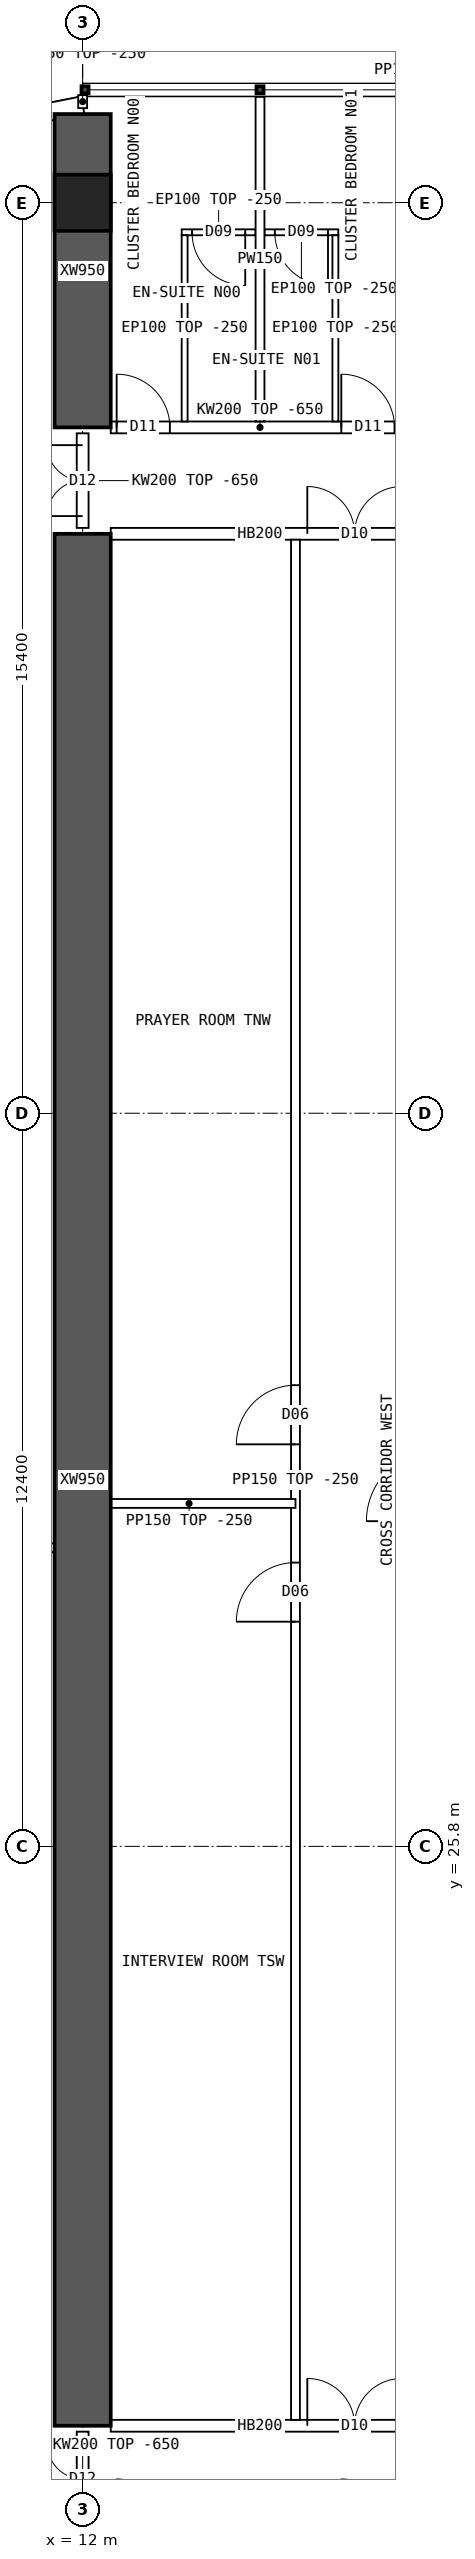
"""IFC4 building model, lengths in metres.
Left out: names, types, materials, properties, quantities, classifications, styles, units other than length and angle.
Written with IfcOpenShell. Run it as: python <this file> out.ifc"""

import sys

from ifc_helpers import new_model, si_unit, direction, frame, frame_2d, origin, origin_2d, place, context, subcontext, project, spatial, polyline, rectangle, hollow_rectangle, outline, extrude, element, fill, save


model = new_model("IFC4")
c1 = context("Model", 3, precision=1e-05, world=origin(), true_north=direction((0.0, 1.0)))
c2 = subcontext(c1, "Body", "Model", "MODEL_VIEW")
j1 = project(units=[si_unit("LENGTHUNIT", "METRE"), si_unit("PLANEANGLEUNIT", "RADIAN")], contexts=[c1])
p1 = place(None, origin())
s1 = spatial("IfcSite", under=j1, at=p1, CompositionType="ELEMENT")
p2 = place(p1, origin())
s2 = spatial("IfcBuilding", under=s1, at=p2, CompositionType="ELEMENT")
p3 = place(p2, frame((0.0, 0.0, 118.15)))
s3 = spatial("IfcBuildingStorey", under=s2, at=p3, CompositionType="ELEMENT", Elevation=118.15)
p4 = place(p3, frame((12.0, 53.6, 0.0), z_axis=(0.0, 0.0, 1.0), x_axis=(1.0, 0.0, 0.0)))
e1 = element("IfcColumn", 1, at=p4, inside=s3, PredefinedType="COLUMN", context=c2, shape_type="SweptSolid", body=[
    extrude(hollow_rectangle(XDim=0.95, YDim=0.95, WallThickness=0.095, at=origin_2d()), origin(), (0.0, 0.0, 1.0), 3.75),
])
p5 = place(p3, frame((12.0, 49.8, 0.0), z_axis=(0.0, 0.0, 1.0), x_axis=(0.0, 1.0, 0.0)))
e2 = element("IfcWall", 2, at=p5, inside=s3, PredefinedType="SHEAR", context=c2, shape_type="SweptSolid", body=[
    extrude(rectangle(XDim=5.3, YDim=0.95, at=frame_2d((2.65, 0.0))), origin(), (0.0, 0.0, 1.0), 3.75),
])
p6 = place(p3, frame((12.0, 16.0, 0.0), z_axis=(0.0, 0.0, 1.0), x_axis=(0.0, 1.0, 0.0)))
e3 = element("IfcWall", 3, at=p6, inside=s3, PredefinedType="SHEAR", context=c2, shape_type="SweptSolid", body=[
    extrude(rectangle(XDim=32.0, YDim=0.95, at=frame_2d((16.0, 0.0))), origin(), (0.0, 0.0, 1.0), 3.75),
])
p7 = place(p3, frame((12.0, 55.25, 0.0), z_axis=(0.0, 0.0, 1.0), x_axis=(-0.980787251524, -0.195080412259, 0.0)))
e4 = element("IfcWall", 4, at=p7, inside=s3, PredefinedType="SOLIDWALL", context=c2, shape_type="SweptSolid", body=[
    extrude(outline(polyline([(-0.03, -0.15), (3.249, -0.15), (3.189, 0.15), (0.03, 0.15), (-0.03, -0.15)])), origin(), (0.0, 0.0, 1.0), 3.5),
])
p8 = place(p7, frame((0.909, 0.0, 0.9)))
e5 = element("IfcOpeningElement", 5, at=p8, cuts=e4, PredefinedType="OPENING", context=c2, shape_type="SweptSolid", body=[
    extrude(rectangle(XDim=1.4, YDim=1.8, at=frame_2d((0.7, 0.9))), frame((0.0, 0.16, 0.0), z_axis=(0.0, -1.0, 0.0), x_axis=(1.0, 0.0, 0.0)), (0.0, 0.0, 1.0), 0.32),
])
p9 = place(p3, frame((12.475, 16.0, 0.0), z_axis=(0.0, 0.0, 1.0), x_axis=(1.0, 0.0, 0.0)))
e6 = element("IfcWall", 6, at=p9, inside=s3, PredefinedType="SOLIDWALL", context=c2, shape_type="SweptSolid", body=[
    extrude(rectangle(XDim=5.05, YDim=0.2, at=frame_2d((2.525, 0.0))), origin(), (0.0, 0.0, 1.0), 3.5),
])
p10 = place(p9, frame((3.325, 0.0, 0.0)))
e7 = element("IfcOpeningElement", 7, at=p10, cuts=e6, PredefinedType="OPENING", context=c2, shape_type="SweptSolid", body=[
    extrude(rectangle(XDim=1.6, YDim=2.1, at=frame_2d((0.8, 1.05))), frame((0.0, 0.11, 0.0), z_axis=(0.0, -1.0, 0.0), x_axis=(1.0, 0.0, 0.0)), (0.0, 0.0, 1.0), 0.22),
])
p11 = place(p3, frame((12.475, 49.8, 0.0), z_axis=(0.0, 0.0, 1.0), x_axis=(1.0, 0.0, 0.0)))
e8 = element("IfcWall", 8, at=p11, inside=s3, PredefinedType="SOLIDWALL", context=c2, shape_type="SweptSolid", body=[
    extrude(outline(polyline([(0.0, 0.0), (5.05, 0.0), (5.05, 3.1), (0.0, 3.1), (0.0, 0.0)])), frame((0.0, 0.1, 0.0), z_axis=(0.0, -1.0, 0.0), x_axis=(1.0, 0.0, 0.0)), (0.0, 0.0, 1.0), 0.2),
])
p12 = place(p11, frame((0.1, 0.0, 0.0)))
e9 = element("IfcOpeningElement", 9, at=p12, cuts=e8, PredefinedType="OPENING", context=c2, shape_type="SweptSolid", body=[
    extrude(rectangle(XDim=0.9, YDim=2.1, at=frame_2d((0.45, 1.05))), frame((0.0, 0.11, 0.0), z_axis=(0.0, -1.0, 0.0), x_axis=(1.0, 0.0, 0.0)), (0.0, 0.0, 1.0), 0.22),
])
p13 = place(p11, frame((3.9, 0.0, 0.0)))
e10 = element("IfcOpeningElement", 10, at=p13, cuts=e8, PredefinedType="OPENING", context=c2, shape_type="SweptSolid", body=[
    extrude(rectangle(XDim=0.9, YDim=2.1, at=frame_2d((0.45, 1.05))), frame((0.0, 0.11, 0.0), z_axis=(0.0, -1.0, 0.0), x_axis=(1.0, 0.0, 0.0)), (0.0, 0.0, 1.0), 0.22),
])
p14 = place(p3, frame((12.475, 48.0, 0.0), z_axis=(0.0, 0.0, 1.0), x_axis=(1.0, 0.0, 0.0)))
e11 = element("IfcWall", 11, at=p14, inside=s3, PredefinedType="SOLIDWALL", context=c2, shape_type="SweptSolid", body=[
    extrude(rectangle(XDim=5.05, YDim=0.2, at=frame_2d((2.525, 0.0))), origin(), (0.0, 0.0, 1.0), 3.5),
])
p15 = place(p14, frame((3.325, 0.0, 0.0)))
e12 = element("IfcOpeningElement", 12, at=p15, cuts=e11, PredefinedType="OPENING", context=c2, shape_type="SweptSolid", body=[
    extrude(rectangle(XDim=1.6, YDim=2.1, at=frame_2d((0.8, 1.05))), frame((0.0, 0.11, 0.0), z_axis=(0.0, -1.0, 0.0), x_axis=(1.0, 0.0, 0.0)), (0.0, 0.0, 1.0), 0.22),
])
p16 = place(p3, frame((15.0, 55.39, 0.0), z_axis=(0.0, 0.0, 1.0), x_axis=(0.0, -1.0, 0.0)))
e13 = element("IfcWall", 13, at=p16, inside=s3, PredefinedType="PARTITIONING", context=c2, shape_type="SweptSolid", body=[
    extrude(outline(polyline([(0.0, 0.0), (5.49, 0.0), (5.49, 3.1), (5.442, 3.1), (5.44, 3.5), (1.992, 3.5), (1.99, 3.1), (1.592, 3.1), (1.59, 3.5), (0.0, 3.5), (0.0, 0.0)])), frame((0.0, 0.075, 0.0), z_axis=(0.0, -1.0, 0.0), x_axis=(1.0, 0.0, 0.0)), (0.0, 0.0, 1.0), 0.15),
])
p17 = place(p3, frame((13.675, 53.1, 0.0), z_axis=(0.0, 0.0, 1.0), x_axis=(1.0, 0.0, 0.0)))
e14 = element("IfcWall", 14, at=p17, inside=s3, PredefinedType="PARTITIONING", context=c2, shape_type="SweptSolid", body=[
    extrude(rectangle(XDim=1.25, YDim=0.1, at=frame_2d((0.625, 0.0))), origin(), (0.0, 0.0, 1.0), 3.5),
])
p18 = place(p17, frame((0.175, 0.0, 0.0)))
e15 = element("IfcOpeningElement", 15, at=p18, cuts=e14, PredefinedType="OPENING", context=c2, shape_type="SweptSolid", body=[
    extrude(rectangle(XDim=0.9, YDim=2.1, at=frame_2d((0.45, 1.05))), frame((0.0, 0.06, 0.0), z_axis=(0.0, -1.0, 0.0), x_axis=(1.0, 0.0, 0.0)), (0.0, 0.0, 1.0), 0.12),
])
p19 = place(p3, frame((13.725, 53.05, 0.0), z_axis=(0.0, 0.0, 1.0), x_axis=(0.0, -1.0, 0.0)))
e16 = element("IfcWall", 16, at=p19, inside=s3, PredefinedType="PARTITIONING", context=c2, shape_type="SweptSolid", body=[
    extrude(outline(polyline([(0.0, 0.0), (3.15, 0.0), (3.15, 3.1), (3.102, 3.1), (3.1, 3.5), (0.0, 3.5), (0.0, 0.0)])), frame((0.0, 0.05, 0.0), z_axis=(0.0, -1.0, 0.0), x_axis=(1.0, 0.0, 0.0)), (0.0, 0.0, 1.0), 0.1),
])
p20 = place(p3, frame((15.075, 53.1, 0.0), z_axis=(0.0, 0.0, 1.0), x_axis=(1.0, 0.0, 0.0)))
e17 = element("IfcWall", 17, at=p20, inside=s3, PredefinedType="PARTITIONING", context=c2, shape_type="SweptSolid", body=[
    extrude(rectangle(XDim=1.25, YDim=0.1, at=frame_2d((0.625, 0.0))), origin(), (0.0, 0.0, 1.0), 3.5),
])
p21 = place(p20, frame((0.175, 0.0, 0.0)))
e18 = element("IfcOpeningElement", 18, at=p21, cuts=e17, PredefinedType="OPENING", context=c2, shape_type="SweptSolid", body=[
    extrude(rectangle(XDim=0.9, YDim=2.1, at=frame_2d((0.45, 1.05))), frame((0.0, 0.06, 0.0), z_axis=(0.0, -1.0, 0.0), x_axis=(1.0, 0.0, 0.0)), (0.0, 0.0, 1.0), 0.12),
])
p22 = place(p3, frame((16.275, 53.05, 0.0), z_axis=(0.0, 0.0, 1.0), x_axis=(0.0, -1.0, 0.0)))
e19 = element("IfcWall", 19, at=p22, inside=s3, PredefinedType="PARTITIONING", context=c2, shape_type="SweptSolid", body=[
    extrude(outline(polyline([(0.0, 0.0), (3.15, 0.0), (3.15, 3.1), (3.102, 3.1), (3.1, 3.5), (0.0, 3.5), (0.0, 0.0)])), frame((0.0, 0.05, 0.0), z_axis=(0.0, -1.0, 0.0), x_axis=(1.0, 0.0, 0.0)), (0.0, 0.0, 1.0), 0.1),
])
p23 = place(p3, frame((15.6, 16.1, 0.0), z_axis=(0.0, 0.0, 1.0), x_axis=(0.0, 1.0, 0.0)))
e20 = element("IfcWall", 20, at=p23, inside=s3, PredefinedType="PARTITIONING", context=c2, shape_type="SweptSolid", body=[
    extrude(rectangle(XDim=31.8, YDim=0.15, at=frame_2d((15.9, 0.0))), origin(), (0.0, 0.0, 1.0), 3.5),
])
p24 = place(p23, frame((13.5, 0.0, 0.0)))
e21 = element("IfcOpeningElement", 21, at=p24, cuts=e20, PredefinedType="OPENING", context=c2, shape_type="SweptSolid", body=[
    extrude(rectangle(XDim=1.0, YDim=2.1, at=frame_2d((0.5, 1.05))), frame((0.0, 0.085, 0.0), z_axis=(0.0, -1.0, 0.0), x_axis=(1.0, 0.0, 0.0)), (0.0, 0.0, 1.0), 0.17),
])
p25 = place(p23, frame((16.5, 0.0, 0.0)))
e22 = element("IfcOpeningElement", 22, at=p25, cuts=e20, PredefinedType="OPENING", context=c2, shape_type="SweptSolid", body=[
    extrude(rectangle(XDim=1.0, YDim=2.1, at=frame_2d((0.5, 1.05))), frame((0.0, 0.085, 0.0), z_axis=(0.0, -1.0, 0.0), x_axis=(1.0, 0.0, 0.0)), (0.0, 0.0, 1.0), 0.17),
])
p26 = place(p3, frame((12.0, 31.6, 0.0), z_axis=(0.0, 0.0, 1.0), x_axis=(1.0, 0.0, 0.0)))
e23 = element("IfcWall", 23, at=p26, inside=s3, PredefinedType="PARTITIONING", context=c2, shape_type="SweptSolid", body=[
    extrude(rectangle(XDim=3.6, YDim=0.15, at=frame_2d((1.8, 0.0))), origin(), (0.0, 0.0, 1.0), 3.5),
])
p27 = place(p3, frame((3.905, 30.85, 0.0), z_axis=(0.0, 0.0, 1.0), x_axis=(1.0, 0.0, 0.0)))
e24 = element("IfcWall", 24, at=p27, inside=s3, PredefinedType="PARTITIONING", context=c2, shape_type="SweptSolid", body=[
    extrude(outline(polyline([(0.0, 0.0), (8.02, 0.0), (8.02, 3.5), (2.397, 3.5), (2.395, 3.05), (1.797, 3.05), (1.795, 3.5), (0.0, 3.5), (0.0, 0.0)])), frame((0.0, 0.075, 0.0), z_axis=(0.0, -1.0, 0.0), x_axis=(1.0, 0.0, 0.0)), (0.0, 0.0, 1.0), 0.15),
])
p28 = place(p3, frame((12.0, 14.3, 0.0), z_axis=(0.0, 0.0, 1.0), x_axis=(0.0, 1.0, 0.0)))
e25 = element("IfcWall", 25, at=p28, inside=s3, PredefinedType="SOLIDWALL", context=c2, shape_type="SweptSolid", body=[
    extrude(outline(polyline([(0.0, 0.0), (1.6, 0.0), (1.6, 3.1), (0.0, 3.1), (0.0, 0.0)])), frame((0.0, 0.1, 0.0), z_axis=(0.0, -1.0, 0.0), x_axis=(1.0, 0.0, 0.0)), (0.0, 0.0, 1.0), 0.2),
])
p29 = place(p28, frame((0.2, 0.0, 0.0)))
e26 = element("IfcOpeningElement", 26, at=p29, cuts=e25, PredefinedType="OPENING", context=c2, shape_type="SweptSolid", body=[
    extrude(rectangle(XDim=1.2, YDim=2.1, at=frame_2d((0.6, 1.05))), frame((0.0, 0.11, 0.0), z_axis=(0.0, -1.0, 0.0), x_axis=(1.0, 0.0, 0.0)), (0.0, 0.0, 1.0), 0.22),
])
p30 = place(p3, frame((12.0, 48.1, 0.0), z_axis=(0.0, 0.0, 1.0), x_axis=(0.0, 1.0, 0.0)))
e27 = element("IfcWall", 27, at=p30, inside=s3, PredefinedType="SOLIDWALL", context=c2, shape_type="SweptSolid", body=[
    extrude(outline(polyline([(0.0, 0.0), (1.6, 0.0), (1.6, 3.1), (0.0, 3.1), (0.0, 0.0)])), frame((0.0, 0.1, 0.0), z_axis=(0.0, -1.0, 0.0), x_axis=(1.0, 0.0, 0.0)), (0.0, 0.0, 1.0), 0.2),
])
p31 = place(p30, frame((0.2, 0.0, 0.0)))
e28 = element("IfcOpeningElement", 28, at=p31, cuts=e27, PredefinedType="OPENING", context=c2, shape_type="SweptSolid", body=[
    extrude(rectangle(XDim=1.2, YDim=2.1, at=frame_2d((0.6, 1.05))), frame((0.0, 0.11, 0.0), z_axis=(0.0, -1.0, 0.0), x_axis=(1.0, 0.0, 0.0)), (0.0, 0.0, 1.0), 0.22),
])
p32 = place(p3, frame((12.0, 55.2, 0.0), z_axis=(0.0, 0.0, 1.0), x_axis=(0.0, 1.0, 0.0)))
e29 = element("IfcWall", 29, at=p32, inside=s3, PredefinedType="PARTITIONING", context=c2, shape_type="SweptSolid", body=[
    extrude(rectangle(XDim=0.22, YDim=0.15, at=frame_2d((0.11, 0.0))), origin(), (0.0, 0.0, 1.0), 3.5),
])
p33 = place(p10, origin())
e30 = element("IfcDoor", 30, at=p33, inside=s3, OperationType="DOUBLE_DOOR_SINGLE_SWING", PredefinedType="DOOR", context=c2, shape_type="SweptSolid", body=[
    extrude(rectangle(XDim=1.6, YDim=2.1, at=frame_2d((0.8, 1.05))), frame((0.0, 0.025, 0.0), z_axis=(0.0, -1.0, 0.0), x_axis=(1.0, 0.0, 0.0)), (0.0, 0.0, 1.0), 0.05),
])
fill(e7, e30)
p34 = place(p15, origin())
e31 = element("IfcDoor", 31, at=p34, inside=s3, OperationType="DOUBLE_DOOR_SINGLE_SWING", PredefinedType="DOOR", context=c2, shape_type="SweptSolid", body=[
    extrude(rectangle(XDim=1.6, YDim=2.1, at=frame_2d((0.8, 1.05))), frame((0.0, 0.025, 0.0), z_axis=(0.0, -1.0, 0.0), x_axis=(1.0, 0.0, 0.0)), (0.0, 0.0, 1.0), 0.05),
])
fill(e12, e31)
p35 = place(p18, origin())
e32 = element("IfcDoor", 32, at=p35, inside=s3, OperationType="SINGLE_SWING_RIGHT", PredefinedType="DOOR", context=c2, shape_type="SweptSolid", body=[
    extrude(rectangle(XDim=0.9, YDim=2.1, at=frame_2d((0.45, 1.05))), frame((0.0, 0.025, 0.0), z_axis=(0.0, -1.0, 0.0), x_axis=(1.0, 0.0, 0.0)), (0.0, 0.0, 1.0), 0.05),
])
fill(e15, e32)
p36 = place(p12, origin())
e33 = element("IfcDoor", 33, at=p36, inside=s3, OperationType="SINGLE_SWING_LEFT", PredefinedType="DOOR", context=c2, shape_type="SweptSolid", body=[
    extrude(rectangle(XDim=0.9, YDim=2.1, at=frame_2d((0.45, 1.05))), frame((0.0, 0.025, 0.0), z_axis=(0.0, -1.0, 0.0), x_axis=(1.0, 0.0, 0.0)), (0.0, 0.0, 1.0), 0.05),
])
fill(e9, e33)
p37 = place(p21, origin())
e34 = element("IfcDoor", 34, at=p37, inside=s3, OperationType="SINGLE_SWING_RIGHT", PredefinedType="DOOR", context=c2, shape_type="SweptSolid", body=[
    extrude(rectangle(XDim=0.9, YDim=2.1, at=frame_2d((0.45, 1.05))), frame((0.0, 0.025, 0.0), z_axis=(0.0, -1.0, 0.0), x_axis=(1.0, 0.0, 0.0)), (0.0, 0.0, 1.0), 0.05),
])
fill(e18, e34)
p38 = place(p13, origin())
e35 = element("IfcDoor", 35, at=p38, inside=s3, OperationType="SINGLE_SWING_LEFT", PredefinedType="DOOR", context=c2, shape_type="SweptSolid", body=[
    extrude(rectangle(XDim=0.9, YDim=2.1, at=frame_2d((0.45, 1.05))), frame((0.0, 0.025, 0.0), z_axis=(0.0, -1.0, 0.0), x_axis=(1.0, 0.0, 0.0)), (0.0, 0.0, 1.0), 0.05),
])
fill(e10, e35)
p39 = place(p24, origin())
e36 = element("IfcDoor", 36, at=p39, inside=s3, OperationType="SINGLE_SWING_LEFT", PredefinedType="DOOR", context=c2, shape_type="SweptSolid", body=[
    extrude(rectangle(XDim=1.0, YDim=2.1, at=frame_2d((0.5, 1.05))), frame((0.0, 0.025, 0.0), z_axis=(0.0, -1.0, 0.0), x_axis=(1.0, 0.0, 0.0)), (0.0, 0.0, 1.0), 0.05),
])
fill(e21, e36)
p40 = place(p25, origin())
e37 = element("IfcDoor", 37, at=p40, inside=s3, OperationType="SINGLE_SWING_LEFT", PredefinedType="DOOR", context=c2, shape_type="SweptSolid", body=[
    extrude(rectangle(XDim=1.0, YDim=2.1, at=frame_2d((0.5, 1.05))), frame((0.0, 0.025, 0.0), z_axis=(0.0, -1.0, 0.0), x_axis=(1.0, 0.0, 0.0)), (0.0, 0.0, 1.0), 0.05),
])
fill(e22, e37)
p41 = place(p29, origin())
e38 = element("IfcDoor", 38, at=p41, inside=s3, OperationType="DOUBLE_DOOR_SINGLE_SWING", PredefinedType="DOOR", context=c2, shape_type="SweptSolid", body=[
    extrude(rectangle(XDim=1.2, YDim=2.1, at=frame_2d((0.6, 1.05))), frame((0.0, 0.025, 0.0), z_axis=(0.0, -1.0, 0.0), x_axis=(1.0, 0.0, 0.0)), (0.0, 0.0, 1.0), 0.05),
])
fill(e26, e38)
p42 = place(p31, origin())
e39 = element("IfcDoor", 39, at=p42, inside=s3, OperationType="DOUBLE_DOOR_SINGLE_SWING", PredefinedType="DOOR", context=c2, shape_type="SweptSolid", body=[
    extrude(rectangle(XDim=1.2, YDim=2.1, at=frame_2d((0.6, 1.05))), frame((0.0, 0.025, 0.0), z_axis=(0.0, -1.0, 0.0), x_axis=(1.0, 0.0, 0.0)), (0.0, 0.0, 1.0), 0.05),
])
fill(e28, e39)
save(model, sys.argv[1])
